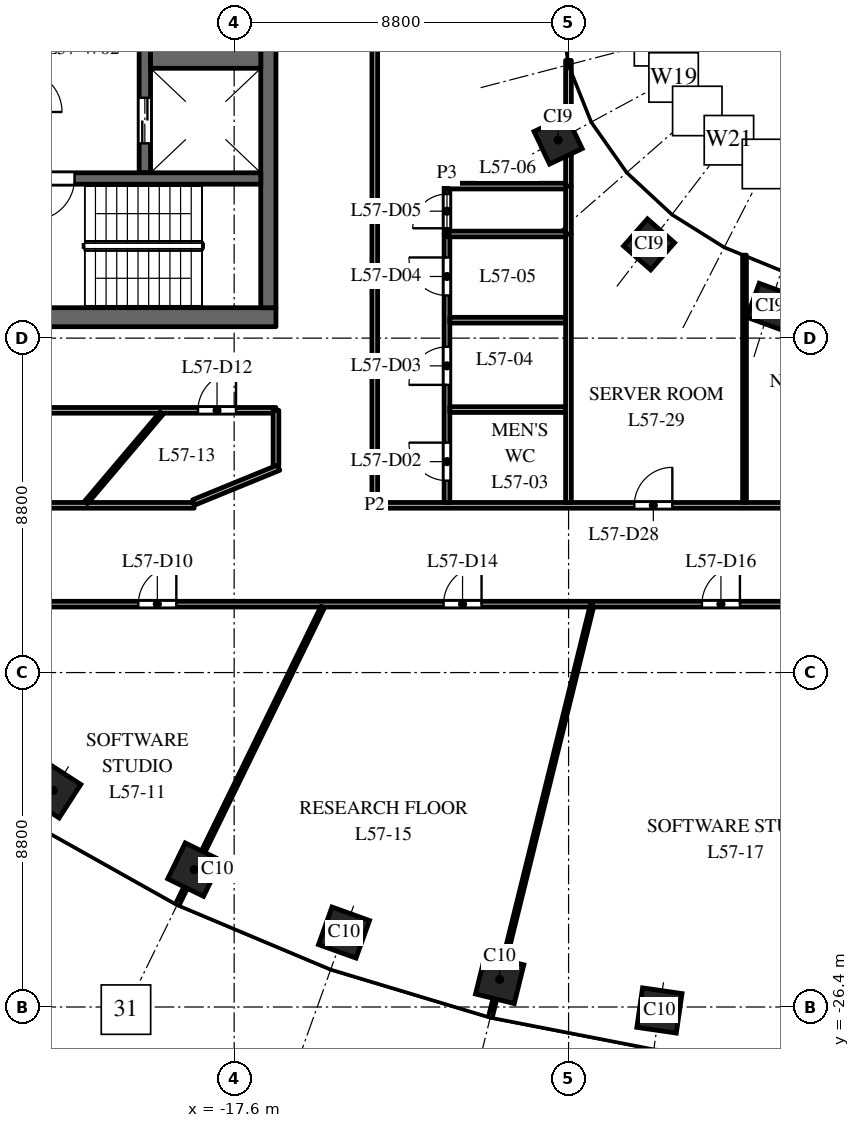
"""IFC4 building model, lengths in metres.
Left out: names, types, materials, properties, quantities, classifications, styles, units other than length and angle.
Written with IfcOpenShell. Run it as: python <this file> out.ifc"""

import sys

from ifc_helpers import new_model, si_unit, direction, frame, frame_2d, origin, origin_2d, place, context, subcontext, project, spatial, rectangle, extrude, element, fill, save


model = new_model("IFC4")
c1 = context("Model", 3, precision=1e-05, world=origin(), true_north=direction((0.0, 1.0)))
c2 = subcontext(c1, "Body", "Model", "MODEL_VIEW")
j1 = project(units=[si_unit("LENGTHUNIT", "METRE"), si_unit("PLANEANGLEUNIT", "RADIAN")], contexts=[c1])
p1 = place(None, origin())
s1 = spatial("IfcSite", under=j1, at=p1, CompositionType="ELEMENT")
p2 = place(p1, origin())
s2 = spatial("IfcBuilding", under=s1, at=p2, CompositionType="ELEMENT")
p3 = place(p2, frame((0.0, 0.0, 269.5)))
s3 = spatial("IfcBuildingStorey", under=s2, at=p3, CompositionType="ELEMENT", Elevation=269.5)
for number, where, z_axis, x_axis in (
    (1, (-22.362, -20.7, 0.0), (0.0, 0.0, 1.0), (0.84, -0.542, 0.0)),
    (2, (-18.646, -22.785, 0.0), (0.0, 0.0, 1.0), (0.898, -0.439, 0.0)),
    (3, (-14.709, -24.441, 0.0), (0.0, 0.0, 1.0), (0.941, -0.338, 0.0)),
    (4, (-10.613, -25.674, 0.0), (0.0, 0.0, 1.0), (0.971, -0.24, 0.0)),
    (5, (-6.409, -26.491, 0.0), (0.0, 0.0, 1.0), (0.99, -0.143, 0.0)),
):
    element("IfcColumn", number, at=place(p3, frame(where, z_axis=z_axis, x_axis=x_axis)), inside=s3, PredefinedType="COLUMN", context=c2, shape_type="SweptSolid", body=[
        extrude(rectangle(XDim=1.05, YDim=1.05, at=origin_2d()), origin(), (0.0, 0.0, 1.0), 4.0),
    ])
for number, where, z_axis, x_axis in (
    (6, (-9.076, -3.588, 0.0), (0.0, 0.0, 1.0), (0.429, -0.903, 0.0)),
    (7, (-6.682, -6.334, 0.0), (0.0, 0.0, 1.0), (0.751, -0.66, 0.0)),
    (8, (-3.501, -7.967, 0.0), (0.0, 0.0, 1.0), (0.939, -0.344, 0.0)),
):
    element("IfcColumn", number, at=place(p3, frame(where, z_axis=z_axis, x_axis=x_axis)), inside=s3, PredefinedType="COLUMN", context=c2, shape_type="SweptSolid", body=[
        extrude(rectangle(XDim=0.95, YDim=0.95, at=origin_2d()), origin(), (0.0, 0.0, 1.0), 4.0),
    ])
p4 = place(p3, frame((-16.5, -8.25, 0.0), z_axis=(0.0, 0.0, 1.0), x_axis=(-1.0, 0.0, 0.0)))
e9 = element("IfcWall", 9, at=p4, inside=s3, PredefinedType="SHEAR", context=c2, shape_type="SweptSolid", body=[
    extrude(rectangle(XDim=15.0, YDim=0.5, at=frame_2d((7.5, 0.0))), origin(), (0.0, 0.0, 1.0), 3.7),
])
p5 = place(p4, frame((6.9, 0.0, 0.0)))
e10 = element("IfcOpeningElement", 10, at=p5, cuts=e9, PredefinedType="OPENING", context=c2, shape_type="SweptSolid", body=[
    extrude(rectangle(XDim=1.2, YDim=2.1, at=frame_2d((0.6, 1.05))), frame((0.0, 0.26, 0.0), z_axis=(0.0, -1.0, 0.0), x_axis=(1.0, 0.0, 0.0)), (0.0, 0.0, 1.0), 0.52),
])
p6 = place(p4, frame((12.95, 0.0, 0.0)))
e11 = element("IfcOpeningElement", 11, at=p6, cuts=e9, PredefinedType="OPENING", context=c2, shape_type="SweptSolid", body=[
    extrude(rectangle(XDim=0.9, YDim=2.1, at=frame_2d((0.45, 1.05))), frame((0.0, 0.26, 0.0), z_axis=(0.0, -1.0, 0.0), x_axis=(1.0, 0.0, 0.0)), (0.0, 0.0, 1.0), 0.52),
])
p7 = place(p3, frame((-19.95, -4.45, 0.0), z_axis=(0.0, 0.0, 1.0), x_axis=(0.0, 1.0, 0.0)))
e12 = element("IfcWall", 12, at=p7, inside=s3, PredefinedType="SHEAR", context=c2, shape_type="SweptSolid", body=[
    extrude(rectangle(XDim=8.9, YDim=0.3, at=frame_2d((4.45, 0.0))), origin(), (0.0, 0.0, 1.0), 3.7),
])
p8 = place(p7, frame((0.775, 0.0, 0.0)))
e13 = element("IfcOpeningElement", 13, at=p8, cuts=e12, PredefinedType="OPENING", context=c2, shape_type="SweptSolid", body=[
    extrude(rectangle(XDim=1.2, YDim=2.1, at=frame_2d((0.6, 1.05))), frame((0.0, 0.16, 0.0), z_axis=(0.0, -1.0, 0.0), x_axis=(1.0, 0.0, 0.0)), (0.0, 0.0, 1.0), 0.32),
])
p9 = place(p7, frame((7.25, 0.0, 0.0)))
e14 = element("IfcOpeningElement", 14, at=p9, cuts=e12, PredefinedType="OPENING", context=c2, shape_type="SweptSolid", body=[
    extrude(rectangle(XDim=1.1, YDim=2.1, at=frame_2d((0.55, 1.05))), frame((0.0, 0.16, 0.0), z_axis=(0.0, -1.0, 0.0), x_axis=(1.0, 0.0, 0.0)), (0.0, 0.0, 1.0), 0.32),
])
p10 = place(p3, frame((-16.7, -8.0, 0.0), z_axis=(0.0, 0.0, 1.0), x_axis=(0.0, 1.0, 0.0)))
e15 = element("IfcWall", 15, at=p10, inside=s3, PredefinedType="SHEAR", context=c2, shape_type="SweptSolid", body=[
    extrude(rectangle(XDim=16.0, YDim=0.4, at=frame_2d((8.0, 0.0))), origin(), (0.0, 0.0, 1.0), 3.7),
])
p11 = place(p3, frame((-16.9, -1.075, 0.0), z_axis=(0.0, 0.0, 1.0), x_axis=(-1.0, 0.0, 0.0)))
e16 = element("IfcWall", 16, at=p11, inside=s3, PredefinedType="SHEAR", context=c2, shape_type="SweptSolid", body=[
    extrude(rectangle(XDim=2.9, YDim=1.25, at=frame_2d((1.45, 0.0))), origin(), (0.0, 0.0, 1.0), 3.7),
])
p12 = place(p3, frame((-16.9, -4.6, 0.0), z_axis=(0.0, 0.0, 1.0), x_axis=(-1.0, 0.0, 0.0)))
e17 = element("IfcWall", 17, at=p12, inside=s3, PredefinedType="SHEAR", context=c2, shape_type="SweptSolid", body=[
    extrude(rectangle(XDim=6.18, YDim=0.3, at=frame_2d((3.09, 0.0))), origin(), (0.0, 0.0, 1.0), 3.7),
])
p13 = place(p12, frame((4.9, 0.0, 0.0)))
e18 = element("IfcOpeningElement", 18, at=p13, cuts=e17, PredefinedType="OPENING", context=c2, shape_type="SweptSolid", body=[
    extrude(rectangle(XDim=1.1, YDim=2.1, at=frame_2d((0.55, 1.05))), frame((0.0, 0.16, 0.0), z_axis=(0.0, -1.0, 0.0), x_axis=(1.0, 0.0, 0.0)), (0.0, 0.0, 1.0), 0.32),
])
p14 = place(p3, frame((-31.5, -10.7, 0.0), z_axis=(0.0, 0.0, 1.0), x_axis=(1.0, 0.0, 0.0)))
e19 = element("IfcWall", 19, at=p14, inside=s3, PredefinedType="PARTITIONING", context=c2, shape_type="SweptSolid", body=[
    extrude(rectangle(XDim=15.0, YDim=0.15, at=frame_2d((7.5, 0.0))), origin(), (0.0, 0.0, 1.0), 3.1),
])
p15 = place(p14, frame((6.629, 0.0, 0.0)))
e20 = element("IfcOpeningElement", 20, at=p15, cuts=e19, PredefinedType="OPENING", context=c2, shape_type="SweptSolid", body=[
    extrude(rectangle(XDim=1.0, YDim=2.1, at=frame_2d((0.5, 1.05))), frame((0.0, 0.085, 0.0), z_axis=(0.0, -1.0, 0.0), x_axis=(1.0, 0.0, 0.0)), (0.0, 0.0, 1.0), 0.17),
])
p16 = place(p14, frame((12.949, 0.0, 0.0)))
e21 = element("IfcOpeningElement", 21, at=p16, cuts=e19, PredefinedType="OPENING", context=c2, shape_type="SweptSolid", body=[
    extrude(rectangle(XDim=1.0, YDim=2.1, at=frame_2d((0.5, 1.05))), frame((0.0, 0.085, 0.0), z_axis=(0.0, -1.0, 0.0), x_axis=(1.0, 0.0, 0.0)), (0.0, 0.0, 1.0), 0.17),
])
p17 = place(p3, frame((-28.0, -15.8, 0.0), z_axis=(0.0, 0.0, 1.0), x_axis=(1.0, 0.0, 0.0)))
e22 = element("IfcWall", 22, at=p17, inside=s3, PredefinedType="PARTITIONING", context=c2, shape_type="SweptSolid", body=[
    extrude(rectangle(XDim=19.809, YDim=0.15, at=frame_2d((9.905, 0.0))), origin(), (0.0, 0.0, 1.0), 2.75),
])
p18 = place(p17, frame((7.878, 0.0, 0.0)))
e23 = element("IfcOpeningElement", 23, at=p18, cuts=e22, PredefinedType="OPENING", context=c2, shape_type="SweptSolid", body=[
    extrude(rectangle(XDim=1.0, YDim=2.1, at=frame_2d((0.5, 1.05))), frame((0.0, 0.085, 0.0), z_axis=(0.0, -1.0, 0.0), x_axis=(1.0, 0.0, 0.0)), (0.0, 0.0, 1.0), 0.17),
])
p19 = place(p17, frame((15.91, 0.0, 0.0)))
e24 = element("IfcOpeningElement", 24, at=p19, cuts=e22, PredefinedType="OPENING", context=c2, shape_type="SweptSolid", body=[
    extrude(rectangle(XDim=1.0, YDim=2.1, at=frame_2d((0.5, 1.05))), frame((0.0, 0.085, 0.0), z_axis=(0.0, -1.0, 0.0), x_axis=(1.0, 0.0, 0.0)), (0.0, 0.0, 1.0), 0.17),
])
p20 = place(p3, frame((-28.0, -13.2, 0.0), z_axis=(0.0, 0.0, 1.0), x_axis=(1.0, 0.0, 0.0)))
e25 = element("IfcWall", 25, at=p20, inside=s3, PredefinedType="PARTITIONING", context=c2, shape_type="SweptSolid", body=[
    extrude(rectangle(XDim=9.347, YDim=0.15, at=frame_2d((4.673, 0.0))), origin(), (0.0, 0.0, 1.0), 2.75),
])
p21 = place(p3, frame((-21.499, -13.125, 0.0), z_axis=(0.0, 0.0, 1.0), x_axis=(0.646354899778, 0.763036921474, 0.0)))
e26 = element("IfcWall", 26, at=p21, inside=s3, PredefinedType="PARTITIONING", context=c2, shape_type="SweptSolid", body=[
    extrude(rectangle(XDim=3.076, YDim=0.1, at=frame_2d((1.538, 0.0))), origin(), (0.0, 0.0, 1.0), 3.7),
])
p22 = place(p3, frame((-19.086, -23.685, 0.0), z_axis=(0.0, 0.0, 1.0), x_axis=(0.439174872977, 0.898401597809, 0.0)))
e27 = element("IfcWall", 27, at=p22, inside=s3, PredefinedType="PARTITIONING", context=c2, shape_type="SweptSolid", body=[
    extrude(rectangle(XDim=8.693, YDim=0.1, at=frame_2d((4.347, 0.0))), origin(), (0.0, 0.0, 1.0), 2.85),
])
p23 = place(p3, frame((-18.664, -13.123, 0.0), z_axis=(0.0, 0.0, 1.0), x_axis=(0.925590432986, 0.378526551731, 0.0)))
e28 = element("IfcWall", 28, at=p23, inside=s3, PredefinedType="PARTITIONING", context=c2, shape_type="SweptSolid", body=[
    extrude(rectangle(XDim=2.415, YDim=0.15, at=frame_2d((1.208, 0.0))), origin(), (0.0, 0.0, 1.0), 2.75),
])
p24 = place(p3, frame((-16.5, -12.157, 0.0), z_axis=(0.0, 0.0, 1.0), x_axis=(0.0, 1.0, 0.0)))
e29 = element("IfcWall", 29, at=p24, inside=s3, PredefinedType="PARTITIONING", context=c2, shape_type="SweptSolid", body=[
    extrude(rectangle(XDim=1.457, YDim=0.15, at=frame_2d((0.729, 0.0))), origin(), (0.0, 0.0, 1.0), 2.75),
])
p25 = place(p3, frame((-13.9, -13.2, 0.0), z_axis=(0.0, 0.0, 1.0), x_axis=(0.0, 1.0, 0.0)))
e30 = element("IfcWall", 30, at=p25, inside=s3, PredefinedType="PARTITIONING", context=c2, shape_type="SweptSolid", body=[
    extrude(rectangle(XDim=26.4, YDim=0.15, at=frame_2d((13.2, 0.0))), origin(), (0.0, 0.0, 1.0), 2.75),
])
p26 = place(p25, frame((12.65, 0.0, 0.0)))
e31 = element("IfcOpeningElement", 31, at=p26, cuts=e30, PredefinedType="OPENING", context=c2, shape_type="SweptSolid", body=[
    extrude(rectangle(XDim=1.0, YDim=2.1, at=frame_2d((0.5, 1.05))), frame((0.0, 0.085, 0.0), z_axis=(0.0, -1.0, 0.0), x_axis=(1.0, 0.0, 0.0)), (0.0, 0.0, 1.0), 0.17),
])
p27 = place(p3, frame((-13.9, -13.2, 0.0), z_axis=(0.0, 0.0, 1.0), x_axis=(1.0, 0.0, 0.0)))
e32 = element("IfcWall", 32, at=p27, inside=s3, PredefinedType="PARTITIONING", context=c2, shape_type="SweptSolid", body=[
    extrude(rectangle(XDim=27.8, YDim=0.15, at=frame_2d((13.9, 0.0))), origin(), (0.0, 0.0, 1.0), 2.85),
])
p28 = place(p27, frame((6.83, 0.0, 0.0)))
e33 = element("IfcOpeningElement", 33, at=p28, cuts=e32, PredefinedType="OPENING", context=c2, shape_type="SweptSolid", body=[
    extrude(rectangle(XDim=1.0, YDim=2.1, at=frame_2d((0.5, 1.05))), frame((0.0, 0.085, 0.0), z_axis=(0.0, -1.0, 0.0), x_axis=(1.0, 0.0, 0.0)), (0.0, 0.0, 1.0), 0.17),
])
p29 = place(p27, frame((11.463, 0.0, 0.0)))
e34 = element("IfcOpeningElement", 34, at=p29, cuts=e32, PredefinedType="OPENING", context=c2, shape_type="SweptSolid", body=[
    extrude(rectangle(XDim=1.0, YDim=2.1, at=frame_2d((0.5, 1.05))), frame((0.0, 0.085, 0.0), z_axis=(0.0, -1.0, 0.0), x_axis=(1.0, 0.0, 0.0)), (0.0, 0.0, 1.0), 0.17),
])
p30 = place(p27, frame((16.097, 0.0, 0.0)))
e35 = element("IfcOpeningElement", 35, at=p30, cuts=e32, PredefinedType="OPENING", context=c2, shape_type="SweptSolid", body=[
    extrude(rectangle(XDim=1.0, YDim=2.1, at=frame_2d((0.5, 1.05))), frame((0.0, 0.085, 0.0), z_axis=(0.0, -1.0, 0.0), x_axis=(1.0, 0.0, 0.0)), (0.0, 0.0, 1.0), 0.17),
])
p31 = place(p3, frame((-12.0, -13.125, 0.0), z_axis=(0.0, 0.0, 1.0), x_axis=(0.0, 1.0, 0.0)))
e36 = element("IfcWall", 36, at=p31, inside=s3, PredefinedType="PARTITIONING", context=c2, shape_type="SweptSolid", body=[
    extrude(rectangle(XDim=7.065, YDim=0.15, at=frame_2d((3.532, 0.0))), origin(), (0.0, 0.0, 1.0), 2.75),
])
p32 = place(p31, frame((0.575, 0.0, 0.0)))
e37 = element("IfcOpeningElement", 37, at=p32, cuts=e36, PredefinedType="OPENING", context=c2, shape_type="SweptSolid", body=[
    extrude(rectangle(XDim=1.0, YDim=2.1, at=frame_2d((0.5, 1.05))), frame((0.0, 0.085, 0.0), z_axis=(0.0, -1.0, 0.0), x_axis=(1.0, 0.0, 0.0)), (0.0, 0.0, 1.0), 0.17),
])
p33 = place(p31, frame((3.095, 0.0, 0.0)))
e38 = element("IfcOpeningElement", 38, at=p33, cuts=e36, PredefinedType="OPENING", context=c2, shape_type="SweptSolid", body=[
    extrude(rectangle(XDim=1.0, YDim=2.1, at=frame_2d((0.5, 1.05))), frame((0.0, 0.085, 0.0), z_axis=(0.0, -1.0, 0.0), x_axis=(1.0, 0.0, 0.0)), (0.0, 0.0, 1.0), 0.17),
])
p34 = place(p31, frame((5.447, 0.0, 0.0)))
e39 = element("IfcOpeningElement", 39, at=p34, cuts=e36, PredefinedType="OPENING", context=c2, shape_type="SweptSolid", body=[
    extrude(rectangle(XDim=1.0, YDim=2.1, at=frame_2d((0.5, 1.05))), frame((0.0, 0.085, 0.0), z_axis=(0.0, -1.0, 0.0), x_axis=(1.0, 0.0, 0.0)), (0.0, 0.0, 1.0), 0.17),
])
p35 = place(p3, frame((-11.925, -10.68, 0.0), z_axis=(0.0, 0.0, 1.0), x_axis=(1.0, 0.0, 0.0)))
e40 = element("IfcWall", 40, at=p35, inside=s3, PredefinedType="PARTITIONING", context=c2, shape_type="SweptSolid", body=[
    extrude(rectangle(XDim=3.047, YDim=0.15, at=frame_2d((1.523, 0.0))), origin(), (0.0, 0.0, 1.0), 3.7),
])
p36 = place(p3, frame((-11.925, -8.328, 0.0), z_axis=(0.0, 0.0, 1.0), x_axis=(1.0, 0.0, 0.0)))
e41 = element("IfcWall", 41, at=p36, inside=s3, PredefinedType="PARTITIONING", context=c2, shape_type="SweptSolid", body=[
    extrude(rectangle(XDim=3.047, YDim=0.15, at=frame_2d((1.523, 0.0))), origin(), (0.0, 0.0, 1.0), 2.75),
])
p37 = place(p3, frame((-12.0, -6.06, 0.0), z_axis=(0.0, 0.0, 1.0), x_axis=(0.0, 1.0, 0.0)))
e42 = element("IfcWall", 42, at=p37, inside=s3, PredefinedType="PARTITIONING", context=c2, shape_type="SweptSolid", body=[
    extrude(rectangle(XDim=1.26, YDim=0.15, at=frame_2d((0.63, 0.0))), origin(), (0.0, 0.0, 1.0), 3.7),
])
p38 = place(p37, frame((0.15, 0.0, 0.0)))
e43 = element("IfcOpeningElement", 43, at=p38, cuts=e42, PredefinedType="OPENING", context=c2, shape_type="SweptSolid", body=[
    extrude(rectangle(XDim=0.9, YDim=2.1, at=frame_2d((0.45, 1.05))), frame((0.0, 0.085, 0.0), z_axis=(0.0, -1.0, 0.0), x_axis=(1.0, 0.0, 0.0)), (0.0, 0.0, 1.0), 0.17),
])
for number, where, z_axis, x_axis in (
    (44, (-12.0, -6.06, 0.0), (0.0, 0.0, 1.0), (1.0, 0.0, 0.0)),
    (45, (-12.0, -4.8, 0.0), (0.0, 0.0, 1.0), (1.0, 0.0, 0.0)),
):
    element("IfcWall", number, at=place(p3, frame(where, z_axis=z_axis, x_axis=x_axis)), inside=s3, PredefinedType="PARTITIONING", context=c2, shape_type="SweptSolid", body=[
        extrude(rectangle(XDim=3.197, YDim=0.15, at=frame_2d((1.599, 0.0))), origin(), (0.0, 0.0, 1.0), 3.7),
    ])
p39 = place(p3, frame((-10.853, -26.646, 0.0), z_axis=(0.0, 0.0, 1.0), x_axis=(0.239794021926, 0.970823787847, 0.0)))
e46 = element("IfcWall", 46, at=p39, inside=s3, PredefinedType="PARTITIONING", context=c2, shape_type="SweptSolid", body=[
    extrude(rectangle(XDim=11.172, YDim=0.1, at=frame_2d((5.586, 0.0))), origin(), (0.0, 0.0, 1.0), 2.85),
])
p40 = place(p3, frame((-8.803, -13.125, 0.0), z_axis=(0.0, 0.0, 1.0), x_axis=(0.0, 1.0, 0.0)))
e47 = element("IfcWall", 47, at=p40, inside=s3, PredefinedType="PARTITIONING", context=c2, shape_type="SweptSolid", body=[
    extrude(rectangle(XDim=7.065, YDim=0.15, at=frame_2d((3.532, 0.0))), origin(), (0.0, 0.0, 1.0), 2.75),
])
p41 = place(p3, frame((-8.803, -6.06, 0.0), z_axis=(0.0, 0.0, 1.0), x_axis=(0.0, 1.0, 0.0)))
e48 = element("IfcWall", 48, at=p41, inside=s3, PredefinedType="PARTITIONING", context=c2, shape_type="SweptSolid", body=[
    extrude(rectangle(XDim=1.26, YDim=0.15, at=frame_2d((0.63, 0.0))), origin(), (0.0, 0.0, 1.0), 3.7),
])
p42 = place(p3, frame((-8.803, -4.8, 0.0), z_axis=(0.0, 0.0, 1.0), x_axis=(0.0, 1.0, 0.0)))
e49 = element("IfcWall", 49, at=p42, inside=s3, PredefinedType="PARTITIONING", context=c2, shape_type="SweptSolid", body=[
    extrude(rectangle(XDim=3.307, YDim=0.15, at=frame_2d((1.654, 0.0))), origin(), (0.0, 0.0, 1.0), 3.0),
])
p43 = place(p3, frame((-8.174, -15.8, 0.0), z_axis=(0.0, 0.0, 1.0), x_axis=(1.0, 0.0, 0.0)))
e50 = element("IfcWall", 50, at=p43, inside=s3, PredefinedType="PARTITIONING", context=c2, shape_type="SweptSolid", body=[
    extrude(rectangle(XDim=6.559, YDim=0.15, at=frame_2d((3.28, 0.0))), origin(), (0.0, 0.0, 1.0), 2.85),
])
p44 = place(p43, frame((2.883, 0.0, 0.0)))
e51 = element("IfcOpeningElement", 51, at=p44, cuts=e50, PredefinedType="OPENING", context=c2, shape_type="SweptSolid", body=[
    extrude(rectangle(XDim=1.0, YDim=2.1, at=frame_2d((0.5, 1.05))), frame((0.0, 0.085, 0.0), z_axis=(0.0, -1.0, 0.0), x_axis=(1.0, 0.0, 0.0)), (0.0, 0.0, 1.0), 0.17),
])
p45 = place(p3, frame((-4.17, -13.125, 0.0), z_axis=(0.0, 0.0, 1.0), x_axis=(0.0, 1.0, 0.0)))
e52 = element("IfcWall", 52, at=p45, inside=s3, PredefinedType="PARTITIONING", context=c2, shape_type="SweptSolid", body=[
    extrude(rectangle(XDim=6.508, YDim=0.1, at=frame_2d((3.254, 0.0))), origin(), (0.0, 0.0, 1.0), 2.85),
])
p46 = place(p8, origin())
e53 = element("IfcDoor", 53, at=p46, inside=s3, OperationType="DOUBLE_DOOR_SLIDING", PredefinedType="DOOR", context=c2, shape_type="SweptSolid", body=[
    extrude(rectangle(XDim=1.2, YDim=2.1, at=frame_2d((0.6, 1.05))), frame((0.0, 0.025, 0.0), z_axis=(0.0, -1.0, 0.0), x_axis=(1.0, 0.0, 0.0)), (0.0, 0.0, 1.0), 0.05),
])
fill(e13, e53)
p47 = place(p13, origin())
e54 = element("IfcDoor", 54, at=p47, inside=s3, OperationType="SINGLE_SWING_LEFT", PredefinedType="DOOR", context=c2, shape_type="SweptSolid", body=[
    extrude(rectangle(XDim=1.1, YDim=2.1, at=frame_2d((0.55, 1.05))), frame((0.0, 0.025, 0.0), z_axis=(0.0, -1.0, 0.0), x_axis=(1.0, 0.0, 0.0)), (0.0, 0.0, 1.0), 0.05),
])
fill(e18, e54)
p48 = place(p32, origin())
e55 = element("IfcDoor", 55, at=p48, inside=s3, OperationType="SINGLE_SWING_RIGHT", PredefinedType="DOOR", context=c2, shape_type="SweptSolid", body=[
    extrude(rectangle(XDim=1.0, YDim=2.1, at=frame_2d((0.5, 1.05))), frame((0.0, 0.025, 0.0), z_axis=(0.0, -1.0, 0.0), x_axis=(1.0, 0.0, 0.0)), (0.0, 0.0, 1.0), 0.05),
])
fill(e37, e55)
p49 = place(p33, origin())
e56 = element("IfcDoor", 56, at=p49, inside=s3, OperationType="SINGLE_SWING_LEFT", PredefinedType="DOOR", context=c2, shape_type="SweptSolid", body=[
    extrude(rectangle(XDim=1.0, YDim=2.1, at=frame_2d((0.5, 1.05))), frame((0.0, 0.025, 0.0), z_axis=(0.0, -1.0, 0.0), x_axis=(1.0, 0.0, 0.0)), (0.0, 0.0, 1.0), 0.05),
])
fill(e38, e56)
p50 = place(p34, origin())
e57 = element("IfcDoor", 57, at=p50, inside=s3, OperationType="SINGLE_SWING_RIGHT", PredefinedType="DOOR", context=c2, shape_type="SweptSolid", body=[
    extrude(rectangle(XDim=1.0, YDim=2.1, at=frame_2d((0.5, 1.05))), frame((0.0, 0.025, 0.0), z_axis=(0.0, -1.0, 0.0), x_axis=(1.0, 0.0, 0.0)), (0.0, 0.0, 1.0), 0.05),
])
fill(e39, e57)
p51 = place(p38, origin())
e58 = element("IfcDoor", 58, at=p51, inside=s3, OperationType="SINGLE_SWING_LEFT", PredefinedType="DOOR", context=c2, shape_type="SweptSolid", body=[
    extrude(rectangle(XDim=0.9, YDim=2.1, at=frame_2d((0.45, 1.05))), frame((0.0, 0.025, 0.0), z_axis=(0.0, -1.0, 0.0), x_axis=(1.0, 0.0, 0.0)), (0.0, 0.0, 1.0), 0.05),
])
fill(e43, e58)
p52 = place(p18, origin())
e59 = element("IfcDoor", 59, at=p52, inside=s3, OperationType="SINGLE_SWING_RIGHT", PredefinedType="DOOR", context=c2, shape_type="SweptSolid", body=[
    extrude(rectangle(XDim=1.0, YDim=2.1, at=frame_2d((0.5, 1.05))), frame((0.0, 0.025, 0.0), z_axis=(0.0, -1.0, 0.0), x_axis=(1.0, 0.0, 0.0)), (0.0, 0.0, 1.0), 0.05),
])
fill(e23, e59)
p53 = place(p16, origin())
e60 = element("IfcDoor", 60, at=p53, inside=s3, OperationType="SINGLE_SWING_RIGHT", PredefinedType="DOOR", context=c2, shape_type="SweptSolid", body=[
    extrude(rectangle(XDim=1.0, YDim=2.1, at=frame_2d((0.5, 1.05))), frame((0.0, 0.025, 0.0), z_axis=(0.0, -1.0, 0.0), x_axis=(1.0, 0.0, 0.0)), (0.0, 0.0, 1.0), 0.05),
])
fill(e21, e60)
p54 = place(p19, origin())
e61 = element("IfcDoor", 61, at=p54, inside=s3, OperationType="SINGLE_SWING_RIGHT", PredefinedType="DOOR", context=c2, shape_type="SweptSolid", body=[
    extrude(rectangle(XDim=1.0, YDim=2.1, at=frame_2d((0.5, 1.05))), frame((0.0, 0.025, 0.0), z_axis=(0.0, -1.0, 0.0), x_axis=(1.0, 0.0, 0.0)), (0.0, 0.0, 1.0), 0.05),
])
fill(e24, e61)
p55 = place(p44, origin())
e62 = element("IfcDoor", 62, at=p55, inside=s3, OperationType="SINGLE_SWING_RIGHT", PredefinedType="DOOR", context=c2, shape_type="SweptSolid", body=[
    extrude(rectangle(XDim=1.0, YDim=2.1, at=frame_2d((0.5, 1.05))), frame((0.0, 0.025, 0.0), z_axis=(0.0, -1.0, 0.0), x_axis=(1.0, 0.0, 0.0)), (0.0, 0.0, 1.0), 0.05),
])
fill(e51, e62)
p56 = place(p28, origin())
e63 = element("IfcDoor", 63, at=p56, inside=s3, OperationType="SINGLE_SWING_RIGHT", PredefinedType="DOOR", context=c2, shape_type="SweptSolid", body=[
    extrude(rectangle(XDim=1.0, YDim=2.1, at=frame_2d((0.5, 1.05))), frame((0.0, 0.025, 0.0), z_axis=(0.0, -1.0, 0.0), x_axis=(1.0, 0.0, 0.0)), (0.0, 0.0, 1.0), 0.05),
])
fill(e33, e63)
save(model, sys.argv[1])
